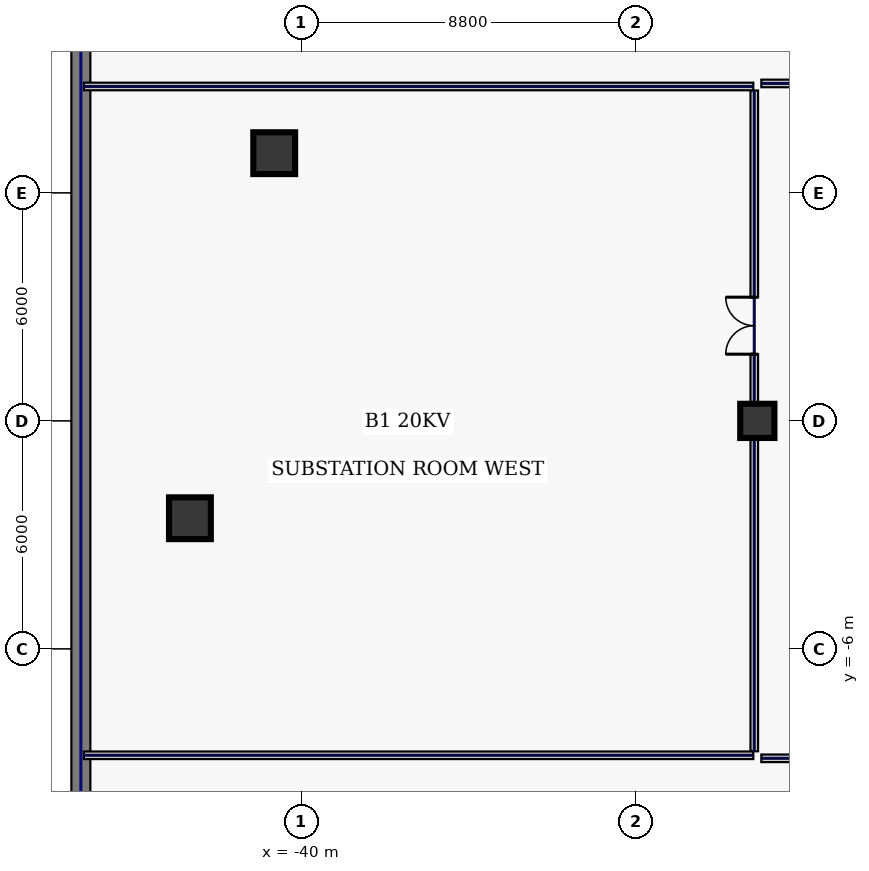
"""IFC4 building model, lengths in metres.
Left out: names, types, materials, properties, quantities, classifications, styles, units other than length and angle.
Written with IfcOpenShell. Run it as: python <this file> out.ifc"""

import sys

from ifc_helpers import new_model, si_unit, direction, frame, frame_2d, origin, origin_2d, place, context, subcontext, project, spatial, rectangle, extrude, element, fill, save


model = new_model("IFC4")
c1 = context("Model", 3, precision=1e-05, world=origin(), true_north=direction((0.0, 1.0)))
c2 = subcontext(c1, "Body", "Model", "MODEL_VIEW")
j1 = project(units=[si_unit("LENGTHUNIT", "METRE"), si_unit("PLANEANGLEUNIT", "RADIAN")], contexts=[c1])
p1 = place(None, origin())
s1 = spatial("IfcSite", under=j1, at=p1, CompositionType="ELEMENT")
p2 = place(p1, origin())
s2 = spatial("IfcBuilding", under=s1, at=p2, CompositionType="ELEMENT")
p3 = place(p2, frame((0.0, 0.0, -5.4)))
s3 = spatial("IfcBuildingStorey", under=s2, at=p3, CompositionType="ELEMENT", Elevation=-5.4)
p4 = place(p3, frame((-45.8, 26.4, 0.0), z_axis=(0.0, 0.0, 1.0), x_axis=(0.0, -1.0, 0.0)))
e1 = element("IfcWall", 1, at=p4, inside=s3, PredefinedType="SHEAR", context=c2, shape_type="SweptSolid", body=[
    extrude(rectangle(XDim=56.2, YDim=0.5, at=frame_2d((28.1, 0.0))), origin(), (0.0, 0.0, 1.0), 5.05),
])
p5 = place(p3, frame((-28.0, 0.0, 0.0), z_axis=(0.0, 0.0, 1.0), x_axis=(1.0, 0.0, 0.0)))
e2 = element("IfcColumn", 2, at=p5, inside=s3, PredefinedType="COLUMN", context=c2, shape_type="SweptSolid", body=[
    extrude(rectangle(XDim=0.9, YDim=0.9, at=origin_2d()), origin(), (0.0, 0.0, 1.0), 5.05),
])
for number, where, z_axis, x_axis in (
    (3, (-40.712, 7.045, 0.0), (0.0, 0.0, 1.0), (1.0, 0.0, 0.0)),
    (4, (-42.93, -2.562, 0.0), (0.0, 0.0, 1.0), (1.0, 0.0, 0.0)),
):
    element("IfcColumn", number, at=place(p3, frame(where, z_axis=z_axis, x_axis=x_axis)), inside=s3, PredefinedType="COLUMN", context=c2, shape_type="SweptSolid", body=[
        extrude(rectangle(XDim=1.1, YDim=1.1, at=origin_2d()), origin(), (0.0, 0.0, 1.0), 5.05),
    ])
p6 = place(p3, frame((-28.08, -8.695, 0.0), z_axis=(0.0, 0.0, 1.0), x_axis=(0.0, 1.0, 0.0)))
e5 = element("IfcWall", 5, at=p6, inside=s3, PredefinedType="SOLIDWALL", context=c2, shape_type="SweptSolid", body=[
    extrude(rectangle(XDim=17.39, YDim=0.2, at=frame_2d((8.695, 0.0))), origin(), (0.0, 0.0, 1.0), 5.05),
])
p7 = place(p6, frame((10.45, 0.0, 0.0)))
e6 = element("IfcOpeningElement", 6, at=p7, cuts=e5, PredefinedType="OPENING", context=c2, shape_type="SweptSolid", body=[
    extrude(rectangle(XDim=1.5, YDim=2.3, at=frame_2d((0.75, 1.15))), frame((0.0, 0.11, 0.0), z_axis=(0.0, -1.0, 0.0), x_axis=(1.0, 0.0, 0.0)), (0.0, 0.0, 1.0), 0.22),
])
p8 = place(p3, frame((-27.895, 8.88, 0.0), z_axis=(0.0, 0.0, 1.0), x_axis=(1.0, 0.0, 0.0)))
e7 = element("IfcWall", 7, at=p8, inside=s3, PredefinedType="SOLIDWALL", context=c2, shape_type="SweptSolid", body=[
    extrude(rectangle(XDim=55.79, YDim=0.2, at=frame_2d((27.895, 0.0))), origin(), (0.0, 0.0, 1.0), 5.05),
])
p9 = place(p8, frame((8.484, 0.0, 0.0)))
e8 = element("IfcOpeningElement", 8, at=p9, cuts=e7, PredefinedType="OPENING", context=c2, shape_type="SweptSolid", body=[
    extrude(rectangle(XDim=1.5, YDim=2.3, at=frame_2d((0.75, 1.15))), frame((0.0, 0.11, 0.0), z_axis=(0.0, -1.0, 0.0), x_axis=(1.0, 0.0, 0.0)), (0.0, 0.0, 1.0), 0.22),
])
p10 = place(p8, frame((31.33, 0.0, 0.0)))
e9 = element("IfcOpeningElement", 9, at=p10, cuts=e7, PredefinedType="OPENING", context=c2, shape_type="SweptSolid", body=[
    extrude(rectangle(XDim=1.5, YDim=2.3, at=frame_2d((0.75, 1.15))), frame((0.0, 0.11, 0.0), z_axis=(0.0, -1.0, 0.0), x_axis=(1.0, 0.0, 0.0)), (0.0, 0.0, 1.0), 0.22),
])
p11 = place(p8, frame((50.096, 0.0, 0.0)))
e10 = element("IfcOpeningElement", 10, at=p11, cuts=e7, PredefinedType="OPENING", context=c2, shape_type="SweptSolid", body=[
    extrude(rectangle(XDim=1.5, YDim=2.3, at=frame_2d((0.75, 1.15))), frame((0.0, 0.11, 0.0), z_axis=(0.0, -1.0, 0.0), x_axis=(1.0, 0.0, 0.0)), (0.0, 0.0, 1.0), 0.22),
])
p12 = place(p3, frame((27.895, -8.88, 0.0), z_axis=(0.0, 0.0, 1.0), x_axis=(-1.0, 0.0, 0.0)))
e11 = element("IfcWall", 11, at=p12, inside=s3, PredefinedType="SOLIDWALL", context=c2, shape_type="SweptSolid", body=[
    extrude(rectangle(XDim=55.79, YDim=0.2, at=frame_2d((27.895, 0.0))), origin(), (0.0, 0.0, 1.0), 5.05),
])
p13 = place(p12, frame((27.25, 0.0, 0.0)))
e12 = element("IfcOpeningElement", 12, at=p13, cuts=e11, PredefinedType="OPENING", context=c2, shape_type="SweptSolid", body=[
    extrude(rectangle(XDim=1.5, YDim=2.3, at=frame_2d((0.75, 1.15))), frame((0.0, 0.11, 0.0), z_axis=(0.0, -1.0, 0.0), x_axis=(1.0, 0.0, 0.0)), (0.0, 0.0, 1.0), 0.22),
])
for number, where, z_axis, x_axis in (
    (13, (-45.72, -8.8, 0.0), (0.0, 0.0, 1.0), (1.0, 0.0, 0.0)),
    (14, (-45.72, 8.8, 0.0), (0.0, 0.0, 1.0), (1.0, 0.0, 0.0)),
):
    element("IfcWall", number, at=place(p3, frame(where, z_axis=z_axis, x_axis=x_axis)), inside=s3, PredefinedType="SOLIDWALL", context=c2, shape_type="SweptSolid", body=[
        extrude(rectangle(XDim=17.615, YDim=0.2, at=frame_2d((8.808, 0.0))), origin(), (0.0, 0.0, 1.0), 5.05),
    ])
p14 = place(p7, origin())
e15 = element("IfcDoor", 15, at=p14, inside=s3, OperationType="DOUBLE_SWING_LEFT", PredefinedType="DOOR", context=c2, shape_type="SweptSolid", body=[
    extrude(rectangle(XDim=1.5, YDim=2.3, at=frame_2d((0.75, 1.15))), frame((0.0, 0.025, 0.0), z_axis=(0.0, -1.0, 0.0), x_axis=(1.0, 0.0, 0.0)), (0.0, 0.0, 1.0), 0.05),
])
fill(e6, e15)
save(model, sys.argv[1])
